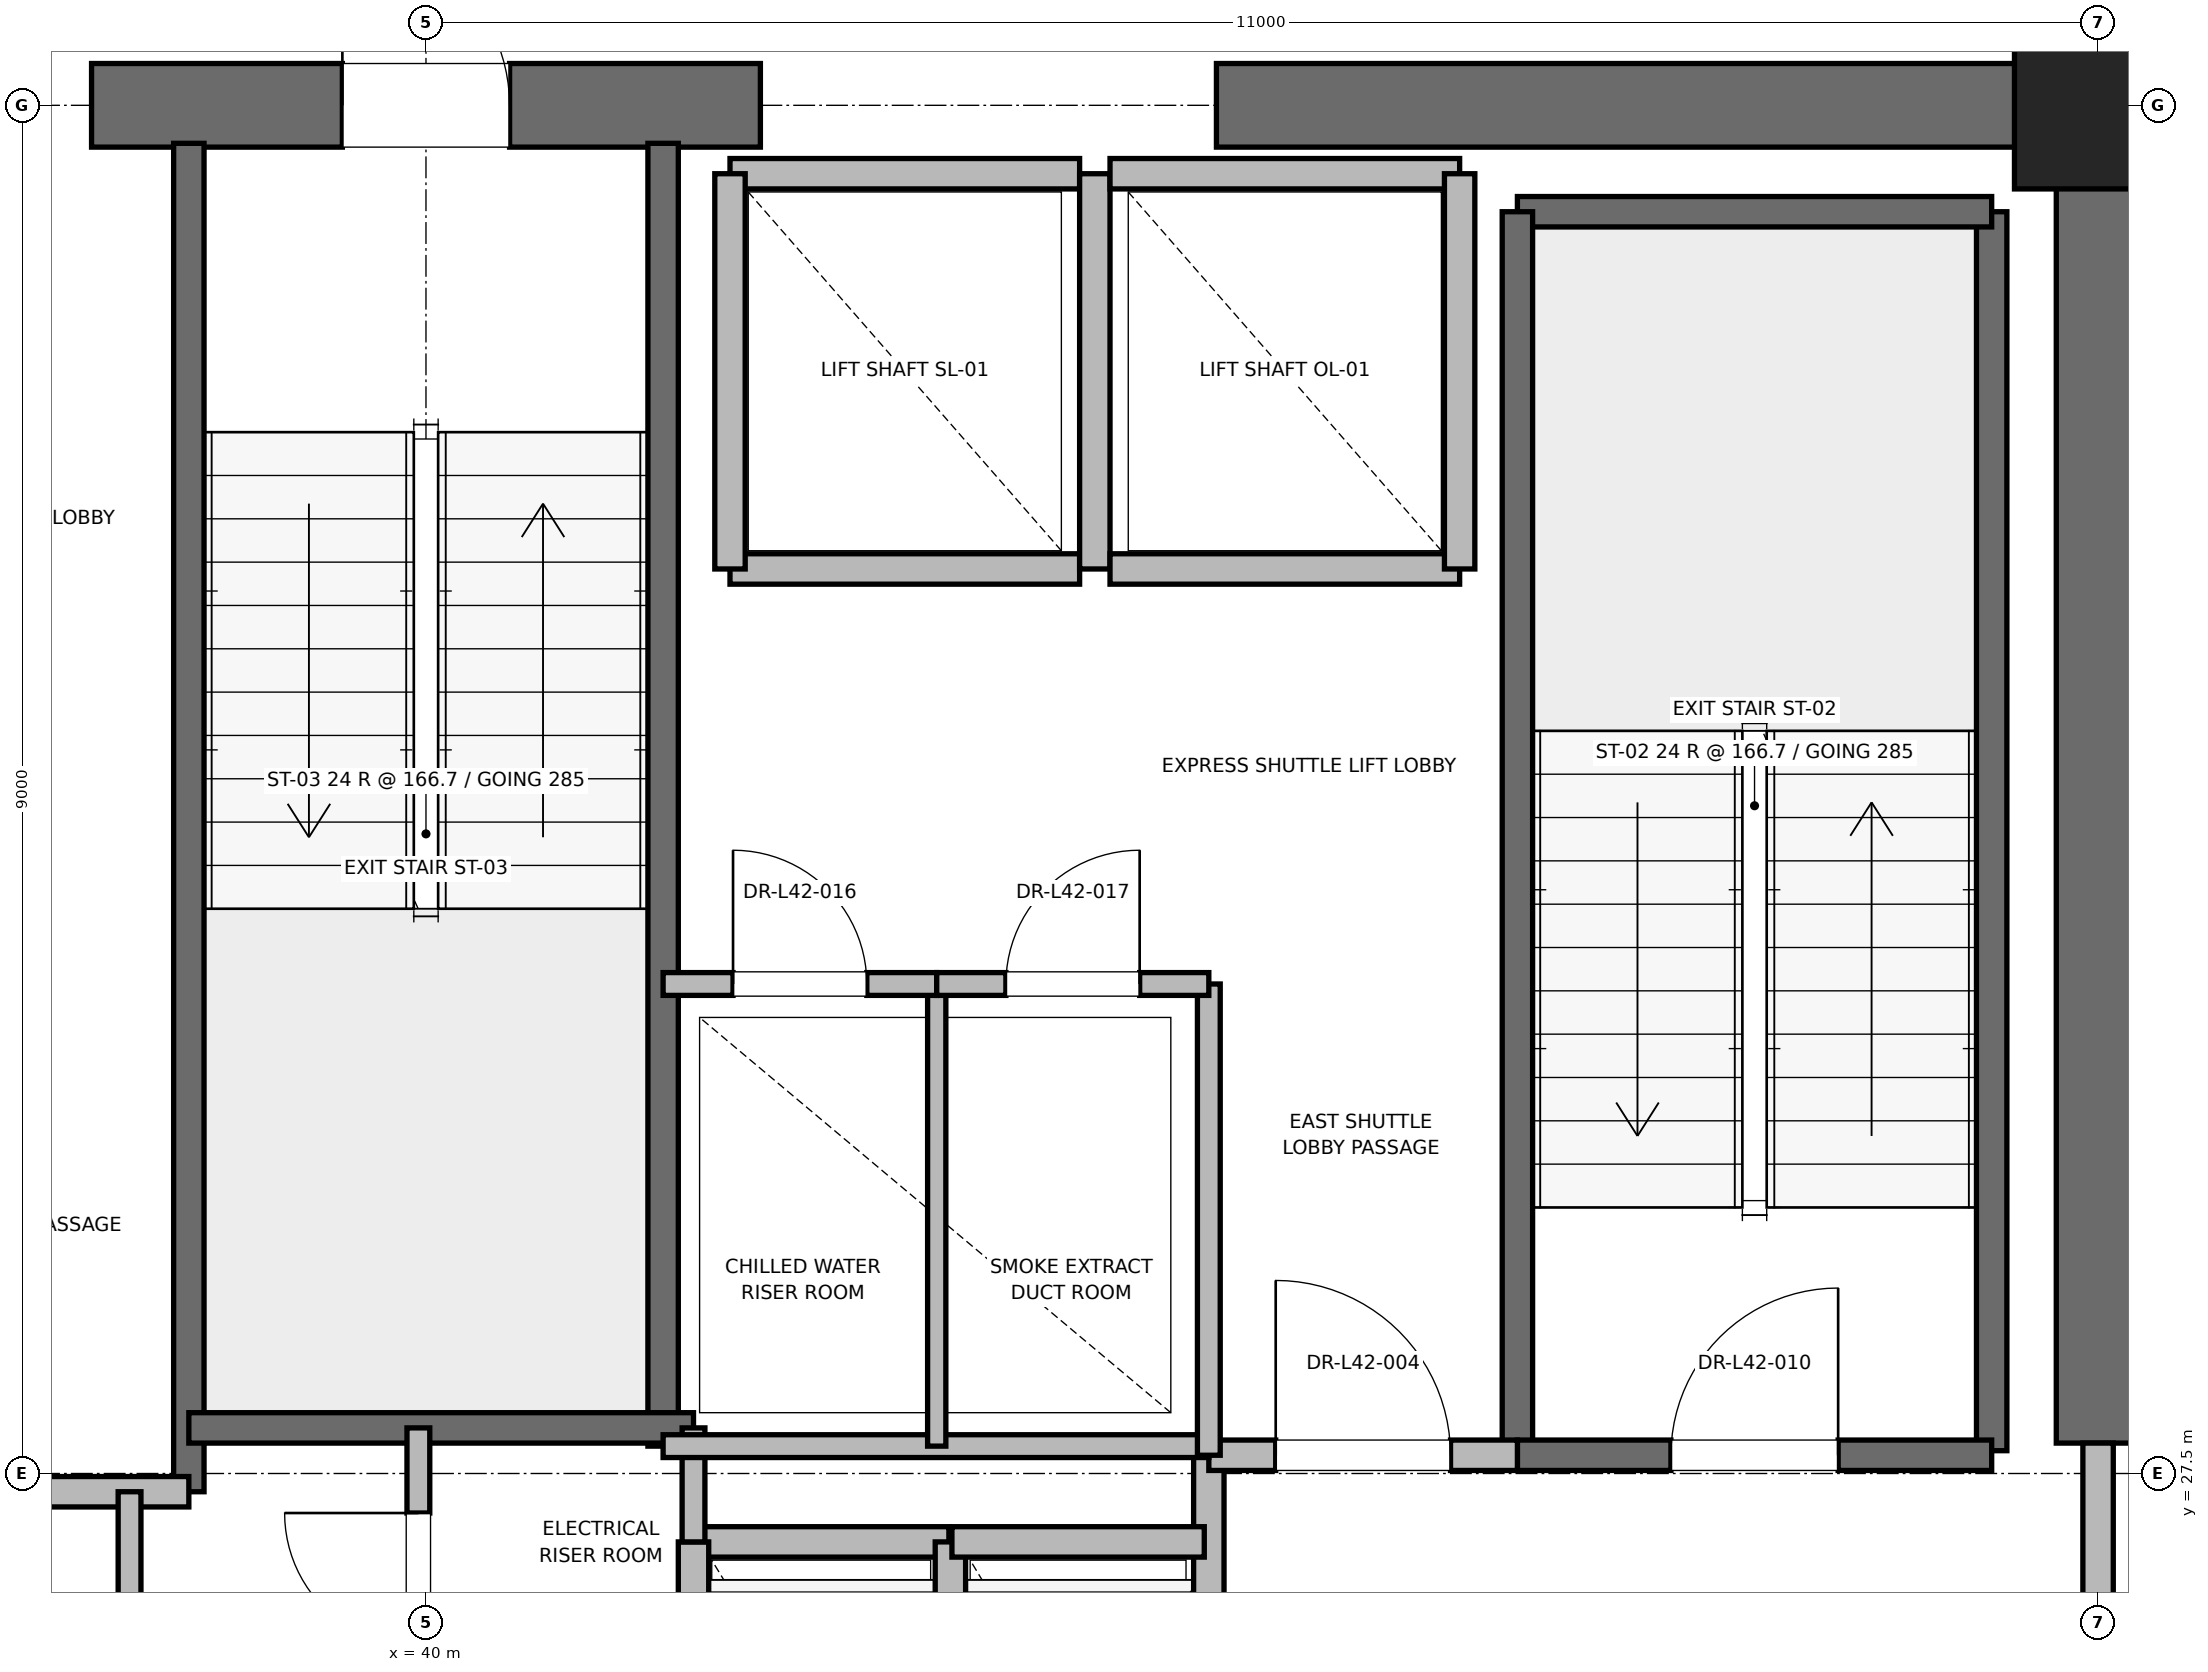
"""IFC4 building model, lengths in metres.
Left out: names, types, materials, properties, quantities, classifications, styles, units other than length and angle.
Written with IfcOpenShell. Run it as: python <this file> out.ifc"""

import sys

from ifc_helpers import new_model, si_unit, direction, frame, frame_2d, origin, origin_2d, place, context, subcontext, project, spatial, rectangle, extrude, element, fill, save


model = new_model("IFC4")
c1 = context("Model", 3, precision=1e-05, world=origin(), true_north=direction((0.0, 1.0)))
c2 = subcontext(c1, "Body", "Model", "MODEL_VIEW")
j1 = project(units=[si_unit("LENGTHUNIT", "METRE"), si_unit("PLANEANGLEUNIT", "RADIAN")], contexts=[c1])
p1 = place(None, origin())
s1 = spatial("IfcSite", under=j1, at=p1, CompositionType="ELEMENT")
p2 = place(p1, origin())
s2 = spatial("IfcBuilding", under=s1, at=p2, CompositionType="ELEMENT")
p3 = place(p2, frame((0.0, 0.0, 180.4)))
s3 = spatial("IfcBuildingStorey", under=s2, at=p3, CompositionType="ELEMENT", Elevation=180.4)
p4 = place(p3, frame((51.0, 36.5, 0.0), z_axis=(0.0, 0.0, 1.0), x_axis=(1.0, 0.0, 0.0)))
e1 = element("IfcColumn", 1, at=p4, inside=s3, PredefinedType="PILASTER", context=c2, shape_type="SweptSolid", body=[
    extrude(rectangle(XDim=1.1, YDim=1.1, at=origin_2d()), origin(), (0.0, 0.0, 1.0), 4.0),
])
p5 = place(p3, frame((37.8, 36.5, 0.0), z_axis=(0.0, 0.0, 1.0), x_axis=(1.0, 0.0, 0.0)))
e2 = element("IfcWall", 2, at=p5, inside=s3, PredefinedType="SHEAR", context=c2, shape_type="SweptSolid", body=[
    extrude(rectangle(XDim=4.4, YDim=0.55, at=frame_2d((2.2, 0.0))), origin(), (0.0, 0.0, 1.0), 3.7),
])
p6 = place(p5, frame((1.65, 0.0, 0.0)))
e3 = element("IfcOpeningElement", 3, at=p6, cuts=e2, PredefinedType="OPENING", context=c2, shape_type="SweptSolid", body=[
    extrude(rectangle(XDim=1.1, YDim=2.15, at=frame_2d((0.55, 1.075))), frame((0.0, 0.275, 0.0), z_axis=(0.0, -1.0, 0.0), x_axis=(1.0, 0.0, 0.0)), (0.0, 0.0, 1.0), 0.55),
])
p7 = place(p3, frame((45.2, 36.5, 0.0), z_axis=(0.0, 0.0, 1.0), x_axis=(1.0, 0.0, 0.0)))
e4 = element("IfcWall", 4, at=p7, inside=s3, PredefinedType="SHEAR", context=c2, shape_type="SweptSolid", body=[
    extrude(rectangle(XDim=5.8, YDim=0.55, at=frame_2d((2.9, 0.0))), origin(), (0.0, 0.0, 1.0), 3.7),
])
p8 = place(p3, frame((51.0, 27.7, 0.0), z_axis=(0.0, 0.0, 1.0), x_axis=(0.0, 1.0, 0.0)))
e5 = element("IfcWall", 5, at=p8, inside=s3, PredefinedType="SHEAR", context=c2, shape_type="SweptSolid", body=[
    extrude(rectangle(XDim=8.8, YDim=0.55, at=frame_2d((4.4, 0.0))), origin(), (0.0, 0.0, 1.0), 3.7),
])
p9 = place(p3, frame((50.3, 27.65, 0.0), z_axis=(0.0, 0.0, 1.0), x_axis=(0.0, 1.0, 0.0)))
e6 = element("IfcWall", 6, at=p9, inside=s3, PredefinedType="SOLIDWALL", context=c2, shape_type="SweptSolid", body=[
    extrude(rectangle(XDim=8.15, YDim=0.2, at=frame_2d((4.075, 0.0))), origin(), (0.0, 0.0, 1.0), 3.7),
])
p10 = place(p3, frame((47.18, 35.8, 0.0), z_axis=(0.0, 0.0, 1.0), x_axis=(1.0, 0.0, 0.0)))
e7 = element("IfcWall", 7, at=p10, inside=s3, PredefinedType="SOLIDWALL", context=c2, shape_type="SweptSolid", body=[
    extrude(rectangle(XDim=3.12, YDim=0.2, at=frame_2d((1.56, 0.0))), origin(), (0.0, 0.0, 1.0), 3.7),
])
p11 = place(p3, frame((47.18, 27.62, 0.0), z_axis=(0.0, 0.0, 1.0), x_axis=(0.0, 1.0, 0.0)))
e8 = element("IfcWall", 8, at=p11, inside=s3, PredefinedType="SOLIDWALL", context=c2, shape_type="SweptSolid", body=[
    extrude(rectangle(XDim=8.18, YDim=0.2, at=frame_2d((4.09, 0.0))), origin(), (0.0, 0.0, 1.0), 3.7),
])
p12 = place(p3, frame((47.18, 27.62, 0.0), z_axis=(0.0, 0.0, 1.0), x_axis=(1.0, 0.0, 0.0)))
e9 = element("IfcWall", 9, at=p12, inside=s3, PredefinedType="SOLIDWALL", context=c2, shape_type="SweptSolid", body=[
    extrude(rectangle(XDim=3.12, YDim=0.2, at=frame_2d((1.56, 0.0))), origin(), (0.0, 0.0, 1.0), 3.7),
])
p13 = place(p12, frame((1.01, 0.0, 0.0)))
e10 = element("IfcOpeningElement", 10, at=p13, cuts=e9, PredefinedType="OPENING", context=c2, shape_type="SweptSolid", body=[
    extrude(rectangle(XDim=1.1, YDim=2.15, at=frame_2d((0.55, 1.075))), frame((0.0, 0.1, 0.0), z_axis=(0.0, -1.0, 0.0), x_axis=(1.0, 0.0, 0.0)), (0.0, 0.0, 1.0), 0.2),
])
p14 = place(p3, frame((38.44, 27.38, 0.0), z_axis=(0.0, 0.0, 1.0), x_axis=(0.0, 1.0, 0.0)))
e11 = element("IfcWall", 11, at=p14, inside=s3, PredefinedType="SOLIDWALL", context=c2, shape_type="SweptSolid", body=[
    extrude(rectangle(XDim=8.87, YDim=0.2, at=frame_2d((4.435, 0.0))), origin(), (0.0, 0.0, 1.0), 3.7),
])
p15 = place(p3, frame((41.56, 27.68, 0.0), z_axis=(0.0, 0.0, 1.0), x_axis=(0.0, 1.0, 0.0)))
e12 = element("IfcWall", 12, at=p15, inside=s3, PredefinedType="SOLIDWALL", context=c2, shape_type="SweptSolid", body=[
    extrude(rectangle(XDim=8.57, YDim=0.2, at=frame_2d((4.285, 0.0))), origin(), (0.0, 0.0, 1.0), 3.7),
])
p16 = place(p3, frame((38.44, 27.8, 0.0), z_axis=(0.0, 0.0, 1.0), x_axis=(1.0, 0.0, 0.0)))
e13 = element("IfcWall", 13, at=p16, inside=s3, PredefinedType="SOLIDWALL", context=c2, shape_type="SweptSolid", body=[
    extrude(rectangle(XDim=3.32, YDim=0.2, at=frame_2d((1.66, 0.0))), origin(), (0.0, 0.0, 1.0), 3.7),
])
p17 = place(p3, frame((32.82, 27.38, 0.0), z_axis=(0.0, 0.0, 1.0), x_axis=(1.0, 0.0, 0.0)))
e14 = element("IfcWall", 14, at=p17, inside=s3, PredefinedType="PARTITIONING", context=c2, shape_type="SweptSolid", body=[
    extrude(rectangle(XDim=5.62, YDim=0.2, at=frame_2d((2.81, 0.0))), origin(), (0.0, 0.0, 1.0), 3.7),
])
p18 = place(p3, frame((45.15, 24.25, 0.0), z_axis=(0.0, 0.0, 1.0), x_axis=(0.0, 1.0, 0.0)))
e15 = element("IfcWall", 15, at=p18, inside=s3, PredefinedType="PARTITIONING", context=c2, shape_type="SweptSolid", body=[
    extrude(rectangle(XDim=3.37, YDim=0.2, at=frame_2d((1.685, 0.0))), origin(), (0.0, 0.0, 1.0), 3.7),
])
p19 = place(p3, frame((45.15, 27.62, 0.0), z_axis=(0.0, 0.0, 1.0), x_axis=(1.0, 0.0, 0.0)))
e16 = element("IfcWall", 16, at=p19, inside=s3, PredefinedType="PARTITIONING", context=c2, shape_type="SweptSolid", body=[
    extrude(rectangle(XDim=2.03, YDim=0.2, at=frame_2d((1.015, 0.0))), origin(), (0.0, 0.0, 1.0), 3.7),
])
p20 = place(p19, frame((0.44, 0.0, 0.0)))
e17 = element("IfcOpeningElement", 17, at=p20, cuts=e16, PredefinedType="OPENING", context=c2, shape_type="SweptSolid", body=[
    extrude(rectangle(XDim=1.15, YDim=2.2, at=frame_2d((0.575, 1.1))), frame((0.0, 0.1, 0.0), z_axis=(0.0, -1.0, 0.0), x_axis=(1.0, 0.0, 0.0)), (0.0, 0.0, 1.0), 0.2),
])
p21 = place(p3, frame((51.0, 24.3, 0.0), z_axis=(0.0, 0.0, 1.0), x_axis=(0.0, 1.0, 0.0)))
e18 = element("IfcWall", 18, at=p21, inside=s3, PredefinedType="PARTITIONING", context=c2, shape_type="SweptSolid", body=[
    extrude(rectangle(XDim=3.4, YDim=0.2, at=frame_2d((1.7, 0.0))), origin(), (0.0, 0.0, 1.0), 2.68),
])
p22 = place(p21, frame((1.125, 0.0, 0.0)))
e19 = element("IfcOpeningElement", 19, at=p22, cuts=e18, PredefinedType="OPENING", context=c2, shape_type="SweptSolid", body=[
    extrude(rectangle(XDim=1.15, YDim=2.2, at=frame_2d((0.575, 1.1))), frame((0.0, 0.1, 0.0), z_axis=(0.0, -1.0, 0.0), x_axis=(1.0, 0.0, 0.0)), (0.0, 0.0, 1.0), 0.2),
])
p23 = place(p3, frame((43.44, 27.05, 0.0), z_axis=(0.0, 0.0, 1.0), x_axis=(-1.0, 0.0, 0.0)))
e20 = element("IfcWall", 20, at=p23, inside=s3, PredefinedType="SOLIDWALL", context=c2, shape_type="SweptSolid", body=[
    extrude(rectangle(XDim=1.68, YDim=0.2, at=frame_2d((0.84, 0.0))), origin(), (0.0, 0.0, 1.0), 3.7),
])
for number, where, z_axis, x_axis in (
    (21, (41.76, 27.05, 0.0), (0.0, 0.0, 1.0), (0.0, -1.0, 0.0)),
    (22, (43.45, 24.45, 0.0), (0.0, 0.0, 1.0), (0.0, 1.0, 0.0)),
):
    element("IfcWall", number, at=place(p3, frame(where, z_axis=z_axis, x_axis=x_axis)), inside=s3, PredefinedType="SOLIDWALL", context=c2, shape_type="SweptSolid", body=[
        extrude(rectangle(XDim=2.6, YDim=0.2, at=frame_2d((1.3, 0.0))), origin(), (0.0, 0.0, 1.0), 3.7),
    ])
p24 = place(p3, frame((45.12, 27.05, 0.0), z_axis=(0.0, 0.0, 1.0), x_axis=(-1.0, 0.0, 0.0)))
e23 = element("IfcWall", 23, at=p24, inside=s3, PredefinedType="SOLIDWALL", context=c2, shape_type="SweptSolid", body=[
    extrude(rectangle(XDim=1.66, YDim=0.2, at=frame_2d((0.83, 0.0))), origin(), (0.0, 0.0, 1.0), 3.7),
])
p25 = place(p3, frame((42.0, 33.45, 0.0), z_axis=(0.0, 0.0, 1.0), x_axis=(1.0, 0.0, 0.0)))
e24 = element("IfcWall", 24, at=p25, inside=s3, PredefinedType="SOLIDWALL", context=c2, shape_type="SweptSolid", body=[
    extrude(rectangle(XDim=2.3, YDim=0.2, at=frame_2d((1.15, 0.0))), origin(), (0.0, 0.0, 1.0), 3.7),
])
p26 = place(p3, frame((44.3, 36.05, 0.0), z_axis=(0.0, 0.0, 1.0), x_axis=(-1.0, 0.0, 0.0)))
e25 = element("IfcWall", 25, at=p26, inside=s3, PredefinedType="SOLIDWALL", context=c2, shape_type="SweptSolid", body=[
    extrude(rectangle(XDim=2.3, YDim=0.2, at=frame_2d((1.15, 0.0))), origin(), (0.0, 0.0, 1.0), 2.68),
])
for number, where, z_axis, x_axis in (
    (26, (42.0, 36.05, 0.0), (0.0, 0.0, 1.0), (0.0, -1.0, 0.0)),
    (27, (44.4, 33.45, 0.0), (0.0, 0.0, 1.0), (0.0, 1.0, 0.0)),
):
    element("IfcWall", number, at=place(p3, frame(where, z_axis=z_axis, x_axis=x_axis)), inside=s3, PredefinedType="SOLIDWALL", context=c2, shape_type="SweptSolid", body=[
        extrude(rectangle(XDim=2.6, YDim=0.2, at=frame_2d((1.3, 0.0))), origin(), (0.0, 0.0, 1.0), 2.68),
    ])
p27 = place(p3, frame((44.5, 33.45, 0.0), z_axis=(0.0, 0.0, 1.0), x_axis=(1.0, 0.0, 0.0)))
e28 = element("IfcWall", 28, at=p27, inside=s3, PredefinedType="SOLIDWALL", context=c2, shape_type="SweptSolid", body=[
    extrude(rectangle(XDim=2.3, YDim=0.2, at=frame_2d((1.15, 0.0))), origin(), (0.0, 0.0, 1.0), 3.7),
])
p28 = place(p3, frame((46.8, 36.05, 0.0), z_axis=(0.0, 0.0, 1.0), x_axis=(-1.0, 0.0, 0.0)))
e29 = element("IfcWall", 29, at=p28, inside=s3, PredefinedType="SOLIDWALL", context=c2, shape_type="SweptSolid", body=[
    extrude(rectangle(XDim=2.3, YDim=0.2, at=frame_2d((1.15, 0.0))), origin(), (0.0, 0.0, 1.0), 2.68),
])
p29 = place(p3, frame((46.8, 33.45, 0.0), z_axis=(0.0, 0.0, 1.0), x_axis=(0.0, 1.0, 0.0)))
e30 = element("IfcWall", 30, at=p29, inside=s3, PredefinedType="SOLIDWALL", context=c2, shape_type="SweptSolid", body=[
    extrude(rectangle(XDim=2.6, YDim=0.2, at=frame_2d((1.3, 0.0))), origin(), (0.0, 0.0, 1.0), 3.7),
])
p30 = place(p3, frame((41.76, 27.05, 0.0), z_axis=(0.0, 0.0, 1.0), x_axis=(0.0, 1.0, 0.0)))
e31 = element("IfcWall", 31, at=p30, inside=s3, PredefinedType="PARTITIONING", context=c2, shape_type="SweptSolid", body=[
    extrude(rectangle(XDim=0.75, YDim=0.15, at=frame_2d((0.375, 0.0))), origin(), (0.0, 0.0, 1.0), 2.85),
])
p31 = place(p3, frame((39.95, 25.8, 0.0), z_axis=(0.0, 0.0, 1.0), x_axis=(0.0, 1.0, 0.0)))
e32 = element("IfcWall", 32, at=p31, inside=s3, PredefinedType="PARTITIONING", context=c2, shape_type="SweptSolid", body=[
    extrude(rectangle(XDim=2.0, YDim=0.15, at=frame_2d((1.0, 0.0))), origin(), (0.0, 0.0, 1.0), 2.85),
])
p32 = place(p31, frame((0.56, 0.0, 0.0)))
e33 = element("IfcOpeningElement", 33, at=p32, cuts=e32, PredefinedType="OPENING", context=c2, shape_type="SweptSolid", body=[
    extrude(rectangle(XDim=0.88, YDim=2.1, at=frame_2d((0.44, 1.05))), frame((0.0, 0.075, 0.0), z_axis=(0.0, -1.0, 0.0), x_axis=(1.0, 0.0, 0.0)), (0.0, 0.0, 1.0), 0.15),
])
p33 = place(p3, frame((38.05, 23.06, 0.0), z_axis=(0.0, 0.0, 1.0), x_axis=(0.0, 1.0, 0.0)))
e34 = element("IfcWall", 34, at=p33, inside=s3, PredefinedType="PARTITIONING", context=c2, shape_type="SweptSolid", body=[
    extrude(rectangle(XDim=4.32, YDim=0.15, at=frame_2d((2.16, 0.0))), origin(), (0.0, 0.0, 1.0), 2.85),
])
p34 = place(p33, frame((1.66, 0.0, 0.0)))
e35 = element("IfcOpeningElement", 35, at=p34, cuts=e34, PredefinedType="OPENING", context=c2, shape_type="SweptSolid", body=[
    extrude(rectangle(XDim=1.0, YDim=2.15, at=frame_2d((0.5, 1.075))), frame((0.0, 0.075, 0.0), z_axis=(0.0, -1.0, 0.0), x_axis=(1.0, 0.0, 0.0)), (0.0, 0.0, 1.0), 0.15),
])
p35 = place(p3, frame((41.56, 27.68, 0.0), z_axis=(0.0, 0.0, 1.0), x_axis=(1.0, 0.0, 0.0)))
e36 = element("IfcWall", 36, at=p35, inside=s3, PredefinedType="PARTITIONING", context=c2, shape_type="SweptSolid", body=[
    extrude(rectangle(XDim=3.59, YDim=0.15, at=frame_2d((1.795, 0.0))), origin(), (0.0, 0.0, 1.0), 2.85),
])
p36 = place(p3, frame((45.15, 27.62, 0.0), z_axis=(0.0, 0.0, 1.0), x_axis=(0.0, 1.0, 0.0)))
e37 = element("IfcWall", 37, at=p36, inside=s3, PredefinedType="PARTITIONING", context=c2, shape_type="SweptSolid", body=[
    extrude(rectangle(XDim=3.1, YDim=0.15, at=frame_2d((1.55, 0.0))), origin(), (0.0, 0.0, 1.0), 2.85),
])
p37 = place(p3, frame((43.36, 27.68, 0.0), z_axis=(0.0, 0.0, 1.0), x_axis=(0.0, 1.0, 0.0)))
e38 = element("IfcWall", 38, at=p37, inside=s3, PredefinedType="PARTITIONING", context=c2, shape_type="SweptSolid", body=[
    extrude(rectangle(XDim=3.04, YDim=0.12, at=frame_2d((1.52, 0.0))), origin(), (0.0, 0.0, 1.0), 2.85),
])
p38 = place(p3, frame((41.56, 30.72, 0.0), z_axis=(0.0, 0.0, 1.0), x_axis=(1.0, 0.0, 0.0)))
e39 = element("IfcWall", 39, at=p38, inside=s3, PredefinedType="PARTITIONING", context=c2, shape_type="SweptSolid", body=[
    extrude(rectangle(XDim=1.8, YDim=0.15, at=frame_2d((0.9, 0.0))), origin(), (0.0, 0.0, 1.0), 2.85),
])
p39 = place(p38, frame((0.46, 0.0, 0.0)))
e40 = element("IfcOpeningElement", 40, at=p39, cuts=e39, PredefinedType="OPENING", context=c2, shape_type="SweptSolid", body=[
    extrude(rectangle(XDim=0.88, YDim=2.1, at=frame_2d((0.44, 1.05))), frame((0.0, 0.075, 0.0), z_axis=(0.0, -1.0, 0.0), x_axis=(1.0, 0.0, 0.0)), (0.0, 0.0, 1.0), 0.15),
])
p40 = place(p3, frame((43.36, 30.72, 0.0), z_axis=(0.0, 0.0, 1.0), x_axis=(1.0, 0.0, 0.0)))
e41 = element("IfcWall", 41, at=p40, inside=s3, PredefinedType="PARTITIONING", context=c2, shape_type="SweptSolid", body=[
    extrude(rectangle(XDim=1.79, YDim=0.15, at=frame_2d((0.895, 0.0))), origin(), (0.0, 0.0, 1.0), 2.85),
])
p41 = place(p40, frame((0.455, 0.0, 0.0)))
e42 = element("IfcOpeningElement", 42, at=p41, cuts=e41, PredefinedType="OPENING", context=c2, shape_type="SweptSolid", body=[
    extrude(rectangle(XDim=0.88, YDim=2.1, at=frame_2d((0.44, 1.05))), frame((0.0, 0.075, 0.0), z_axis=(0.0, -1.0, 0.0), x_axis=(1.0, 0.0, 0.0)), (0.0, 0.0, 1.0), 0.15),
])
p42 = place(p13, origin())
e43 = element("IfcDoor", 43, at=p42, inside=s3, OperationType="SINGLE_SWING_RIGHT", PredefinedType="DOOR", context=c2, shape_type="SweptSolid", body=[
    extrude(rectangle(XDim=1.1, YDim=2.15, at=frame_2d((0.55, 1.075))), frame((0.0, 0.025, 0.0), z_axis=(0.0, -1.0, 0.0), x_axis=(1.0, 0.0, 0.0)), (0.0, 0.0, 1.0), 0.05),
])
fill(e10, e43)
p43 = place(p6, origin())
e44 = element("IfcDoor", 44, at=p43, inside=s3, OperationType="SINGLE_SWING_LEFT", PredefinedType="DOOR", context=c2, shape_type="SweptSolid", body=[
    extrude(rectangle(XDim=1.1, YDim=2.15, at=frame_2d((0.55, 1.075))), frame((0.0, 0.025, 0.0), z_axis=(0.0, -1.0, 0.0), x_axis=(1.0, 0.0, 0.0)), (0.0, 0.0, 1.0), 0.05),
])
fill(e3, e44)
p44 = place(p20, origin())
e45 = element("IfcDoor", 45, at=p44, inside=s3, OperationType="SINGLE_SWING_LEFT", PredefinedType="DOOR", context=c2, shape_type="SweptSolid", body=[
    extrude(rectangle(XDim=1.15, YDim=2.2, at=frame_2d((0.575, 1.1))), frame((0.0, 0.025, 0.0), z_axis=(0.0, -1.0, 0.0), x_axis=(1.0, 0.0, 0.0)), (0.0, 0.0, 1.0), 0.05),
])
fill(e17, e45)
p45 = place(p32, origin())
e46 = element("IfcDoor", 46, at=p45, inside=s3, OperationType="SINGLE_SWING_RIGHT", PredefinedType="DOOR", context=c2, shape_type="SweptSolid", body=[
    extrude(rectangle(XDim=0.88, YDim=2.1, at=frame_2d((0.44, 1.05))), frame((0.0, 0.025, 0.0), z_axis=(0.0, -1.0, 0.0), x_axis=(1.0, 0.0, 0.0)), (0.0, 0.0, 1.0), 0.05),
])
fill(e33, e46)
p46 = place(p39, origin())
e47 = element("IfcDoor", 47, at=p46, inside=s3, OperationType="SINGLE_SWING_LEFT", PredefinedType="DOOR", context=c2, shape_type="SweptSolid", body=[
    extrude(rectangle(XDim=0.88, YDim=2.1, at=frame_2d((0.44, 1.05))), frame((0.0, 0.025, 0.0), z_axis=(0.0, -1.0, 0.0), x_axis=(1.0, 0.0, 0.0)), (0.0, 0.0, 1.0), 0.05),
])
fill(e40, e47)
p47 = place(p41, origin())
e48 = element("IfcDoor", 48, at=p47, inside=s3, OperationType="SINGLE_SWING_RIGHT", PredefinedType="DOOR", context=c2, shape_type="SweptSolid", body=[
    extrude(rectangle(XDim=0.88, YDim=2.1, at=frame_2d((0.44, 1.05))), frame((0.0, 0.025, 0.0), z_axis=(0.0, -1.0, 0.0), x_axis=(1.0, 0.0, 0.0)), (0.0, 0.0, 1.0), 0.05),
])
fill(e42, e48)
save(model, sys.argv[1])
